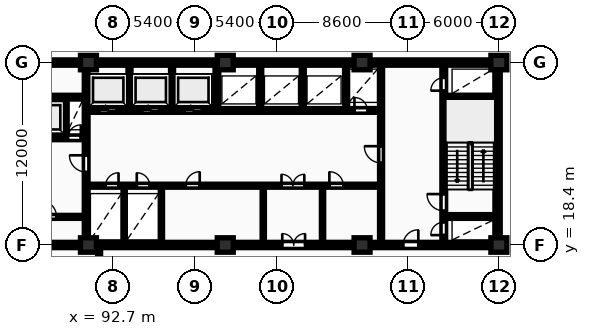
"""IFC4 building model, lengths in metres.
Left out: names, types, materials, properties, quantities, classifications, styles, units other than length and angle.
Written with IfcOpenShell. Run it as: python <this file> out.ifc"""

import sys

from ifc_helpers import new_model, si_unit, direction, frame, frame_2d, origin, origin_2d, place, context, subcontext, project, spatial, rectangle, extrude, element, fill, save


model = new_model("IFC4")
c1 = context("Model", 3, precision=1e-05, world=origin(), true_north=direction((0.0, 1.0)))
c2 = subcontext(c1, "Body", "Model", "MODEL_VIEW")
j1 = project(units=[si_unit("LENGTHUNIT", "METRE"), si_unit("PLANEANGLEUNIT", "RADIAN")], contexts=[c1])
p1 = place(None, origin())
s1 = spatial("IfcSite", under=j1, at=p1, CompositionType="ELEMENT")
p2 = place(p1, origin())
s2 = spatial("IfcBuilding", under=s1, at=p2, CompositionType="ELEMENT")
p3 = place(p2, frame((0.0, 0.0, 10.0)))
s3 = spatial("IfcBuildingStorey", under=s2, at=p3, CompositionType="ELEMENT", Elevation=10.0)
for number, where, z_axis, x_axis in (
    (1, (91.1, 18.4, 0.0), (0.0, 0.0, 1.0), (1.0, 0.0, 0.0)),
    (2, (91.1, 30.4, 0.0), (0.0, 0.0, 1.0), (1.0, 0.0, 0.0)),
    (3, (100.1, 18.4, 0.0), (0.0, 0.0, 1.0), (1.0, 0.0, 0.0)),
    (4, (100.1, 30.4, 0.0), (0.0, 0.0, 1.0), (1.0, 0.0, 0.0)),
    (5, (109.1, 18.4, 0.0), (0.0, 0.0, 1.0), (1.0, 0.0, 0.0)),
    (6, (109.1, 30.4, 0.0), (0.0, 0.0, 1.0), (1.0, 0.0, 0.0)),
    (7, (118.1, 18.4, 0.0), (0.0, 0.0, 1.0), (1.0, 0.0, 0.0)),
    (8, (118.1, 30.4, 0.0), (0.0, 0.0, 1.0), (1.0, 0.0, 0.0)),
):
    element("IfcColumn", number, at=place(p3, frame(where, z_axis=z_axis, x_axis=x_axis)), inside=s3, PredefinedType="COLUMN", context=c2, shape_type="SweptSolid", body=[
        extrude(rectangle(XDim=1.05, YDim=0.95, at=origin_2d()), origin(), (0.0, 0.0, 1.0), 4.5),
    ])
p4 = place(p3, frame((81.925, 30.4, 0.0), z_axis=(0.0, 0.0, 1.0), x_axis=(1.0, 0.0, 0.0)))
e9 = element("IfcWall", 9, at=p4, inside=s3, PredefinedType="SHEAR", context=c2, shape_type="SweptSolid", body=[
    extrude(rectangle(XDim=36.265, YDim=0.35, at=frame_2d((18.132, 0.0))), origin(), (0.0, 0.0, 1.0), 4.5),
])
p5 = place(p3, frame((118.015, 18.575, 0.0), z_axis=(0.0, 0.0, 1.0), x_axis=(0.0, 1.0, 0.0)))
e10 = element("IfcWall", 10, at=p5, inside=s3, PredefinedType="SHEAR", context=c2, shape_type="SweptSolid", body=[
    extrude(rectangle(XDim=11.65, YDim=0.35, at=frame_2d((5.825, 0.0))), origin(), (0.0, 0.0, 1.0), 4.5),
])
p6 = place(p3, frame((81.925, 18.4, 0.0), z_axis=(0.0, 0.0, 1.0), x_axis=(1.0, 0.0, 0.0)))
e11 = element("IfcWall", 11, at=p6, inside=s3, PredefinedType="SHEAR", context=c2, shape_type="SweptSolid", body=[
    extrude(rectangle(XDim=36.265, YDim=0.35, at=frame_2d((18.132, 0.0))), origin(), (0.0, 0.0, 1.0), 4.5),
])
p7 = place(p6, frame((5.675, 0.0, 0.0)))
e12 = element("IfcOpeningElement", 12, at=p7, cuts=e11, PredefinedType="OPENING", context=c2, shape_type="SweptSolid", body=[
    extrude(rectangle(XDim=1.0, YDim=2.15, at=frame_2d((0.5, 1.075))), frame((0.0, 0.185, 0.0), z_axis=(0.0, -1.0, 0.0), x_axis=(1.0, 0.0, 0.0)), (0.0, 0.0, 1.0), 0.37),
])
p8 = place(p6, frame((21.925, 0.0, 0.0)))
e13 = element("IfcOpeningElement", 13, at=p8, cuts=e11, PredefinedType="OPENING", context=c2, shape_type="SweptSolid", body=[
    extrude(rectangle(XDim=1.5, YDim=2.2, at=frame_2d((0.75, 1.1))), frame((0.0, 0.185, 0.0), z_axis=(0.0, -1.0, 0.0), x_axis=(1.0, 0.0, 0.0)), (0.0, 0.0, 1.0), 0.37),
])
p9 = place(p6, frame((29.875, 0.0, 0.0)))
e14 = element("IfcOpeningElement", 14, at=p9, cuts=e11, PredefinedType="OPENING", context=c2, shape_type="SweptSolid", body=[
    extrude(rectangle(XDim=1.0, YDim=2.15, at=frame_2d((0.5, 1.075))), frame((0.0, 0.185, 0.0), z_axis=(0.0, -1.0, 0.0), x_axis=(1.0, 0.0, 0.0)), (0.0, 0.0, 1.0), 0.37),
])
p10 = place(p3, frame((83.0, 28.125, 0.0), z_axis=(0.0, 0.0, 1.0), x_axis=(1.0, 0.0, 0.0)))
e15 = element("IfcWall", 15, at=p10, inside=s3, PredefinedType="SHEAR", context=c2, shape_type="SweptSolid", body=[
    extrude(rectangle(XDim=7.82, YDim=0.25, at=frame_2d((3.91, 0.0))), origin(), (0.0, 0.0, 1.0), 4.5),
])
p11 = place(p3, frame((86.5, 25.45, 0.0), z_axis=(0.0, 0.0, 1.0), x_axis=(1.0, 0.0, 0.0)))
e16 = element("IfcWall", 16, at=p11, inside=s3, PredefinedType="SHEAR", context=c2, shape_type="SweptSolid", body=[
    extrude(rectangle(XDim=4.32, YDim=0.25, at=frame_2d((2.16, 0.0))), origin(), (0.0, 0.0, 1.0), 4.5),
])
p12 = place(p11, frame((1.14, 0.0, 0.0)))
e17 = element("IfcOpeningElement", 17, at=p12, cuts=e16, PredefinedType="OPENING", context=c2, shape_type="SweptSolid", body=[
    extrude(rectangle(XDim=1.12, YDim=2.12, at=frame_2d((0.56, 1.06))), frame((0.0, 0.135, 0.0), z_axis=(0.0, -1.0, 0.0), x_axis=(1.0, 0.0, 0.0)), (0.0, 0.0, 1.0), 0.27),
])
p13 = place(p11, frame((3.25, 0.0, 0.0)))
e18 = element("IfcOpeningElement", 18, at=p13, cuts=e16, PredefinedType="OPENING", context=c2, shape_type="SweptSolid", body=[
    extrude(rectangle(XDim=0.85, YDim=2.05, at=frame_2d((0.425, 1.025))), frame((0.0, 0.135, 0.0), z_axis=(0.0, -1.0, 0.0), x_axis=(1.0, 0.0, 0.0)), (0.0, 0.0, 1.0), 0.27),
])
p14 = place(p3, frame((89.6, 25.58, 0.0), z_axis=(0.0, 0.0, 1.0), x_axis=(0.0, 1.0, 0.0)))
e19 = element("IfcWall", 19, at=p14, inside=s3, PredefinedType="PARTITIONING", context=c2, shape_type="SweptSolid", body=[
    extrude(rectangle(XDim=2.42, YDim=0.2, at=frame_2d((1.21, 0.0))), origin(), (0.0, 0.0, 1.0), 4.2),
])
p15 = place(p3, frame((86.5, 20.25, 0.0), z_axis=(0.0, 0.0, 1.0), x_axis=(1.0, 0.0, 0.0)))
e20 = element("IfcWall", 20, at=p15, inside=s3, PredefinedType="PARTITIONING", context=c2, shape_type="SweptSolid", body=[
    extrude(rectangle(XDim=4.32, YDim=0.2, at=frame_2d((2.16, 0.0))), origin(), (0.0, 0.0, 1.0), 4.2),
])
p16 = place(p15, frame((1.4, 0.0, 0.0)))
e21 = element("IfcOpeningElement", 21, at=p16, cuts=e20, PredefinedType="OPENING", context=c2, shape_type="SweptSolid", body=[
    extrude(rectangle(XDim=1.1, YDim=2.1, at=frame_2d((0.55, 1.05))), frame((0.0, 0.11, 0.0), z_axis=(0.0, -1.0, 0.0), x_axis=(1.0, 0.0, 0.0)), (0.0, 0.0, 1.0), 0.22),
])
p17 = place(p3, frame((90.95, 18.6, 0.0), z_axis=(0.0, 0.0, 1.0), x_axis=(0.0, 1.0, 0.0)))
e22 = element("IfcWall", 22, at=p17, inside=s3, PredefinedType="SHEAR", context=c2, shape_type="SweptSolid", body=[
    extrude(rectangle(XDim=11.6, YDim=0.25, at=frame_2d((5.8, 0.0))), origin(), (0.0, 0.0, 1.0), 4.5),
])
p18 = place(p17, frame((4.6, 0.0, 0.0)))
e23 = element("IfcOpeningElement", 23, at=p18, cuts=e22, PredefinedType="OPENING", context=c2, shape_type="SweptSolid", body=[
    extrude(rectangle(XDim=1.1, YDim=2.1, at=frame_2d((0.55, 1.05))), frame((0.0, 0.135, 0.0), z_axis=(0.0, -1.0, 0.0), x_axis=(1.0, 0.0, 0.0)), (0.0, 0.0, 1.0), 0.27),
])
for number, where, z_axis, x_axis in (
    (24, (93.8, 27.38, 0.0), (0.0, 0.0, 1.0), (0.0, 1.0, 0.0)),
    (25, (96.6, 27.38, 0.0), (0.0, 0.0, 1.0), (0.0, 1.0, 0.0)),
):
    element("IfcWall", number, at=place(p3, frame(where, z_axis=z_axis, x_axis=x_axis)), inside=s3, PredefinedType="PARTITIONING", context=c2, shape_type="SweptSolid", body=[
        extrude(rectangle(XDim=2.82, YDim=0.2, at=frame_2d((1.41, 0.0))), origin(), (0.0, 0.0, 1.0), 4.2),
    ])
p19 = place(p3, frame((91.08, 27.25, 0.0), z_axis=(0.0, 0.0, 1.0), x_axis=(1.0, 0.0, 0.0)))
e26 = element("IfcWall", 26, at=p19, inside=s3, PredefinedType="SHEAR", context=c2, shape_type="SweptSolid", body=[
    extrude(rectangle(XDim=8.34, YDim=0.25, at=frame_2d((4.17, 0.0))), origin(), (0.0, 0.0, 1.0), 4.5),
])
p20 = place(p19, frame((0.76, 0.0, 0.0)))
e27 = element("IfcOpeningElement", 27, at=p20, cuts=e26, PredefinedType="OPENING", context=c2, shape_type="SweptSolid", body=[
    extrude(rectangle(XDim=1.12, YDim=2.12, at=frame_2d((0.56, 1.06))), frame((0.0, 0.135, 0.0), z_axis=(0.0, -1.0, 0.0), x_axis=(1.0, 0.0, 0.0)), (0.0, 0.0, 1.0), 0.27),
])
p21 = place(p19, frame((3.56, 0.0, 0.0)))
e28 = element("IfcOpeningElement", 28, at=p21, cuts=e26, PredefinedType="OPENING", context=c2, shape_type="SweptSolid", body=[
    extrude(rectangle(XDim=1.12, YDim=2.12, at=frame_2d((0.56, 1.06))), frame((0.0, 0.135, 0.0), z_axis=(0.0, -1.0, 0.0), x_axis=(1.0, 0.0, 0.0)), (0.0, 0.0, 1.0), 0.27),
])
p22 = place(p19, frame((6.36, 0.0, 0.0)))
e29 = element("IfcOpeningElement", 29, at=p22, cuts=e26, PredefinedType="OPENING", context=c2, shape_type="SweptSolid", body=[
    extrude(rectangle(XDim=1.12, YDim=2.12, at=frame_2d((0.56, 1.06))), frame((0.0, 0.135, 0.0), z_axis=(0.0, -1.0, 0.0), x_axis=(1.0, 0.0, 0.0)), (0.0, 0.0, 1.0), 0.27),
])
p23 = place(p3, frame((99.55, 27.25, 0.0), z_axis=(0.0, 0.0, 1.0), x_axis=(0.0, 1.0, 0.0)))
e30 = element("IfcWall", 30, at=p23, inside=s3, PredefinedType="SHEAR", context=c2, shape_type="SweptSolid", body=[
    extrude(rectangle(XDim=2.95, YDim=0.25, at=frame_2d((1.475, 0.0))), origin(), (0.0, 0.0, 1.0), 4.5),
])
for number, where, z_axis, x_axis in (
    (31, (102.4, 27.38, 0.0), (0.0, 0.0, 1.0), (0.0, 1.0, 0.0)),
    (32, (105.2, 27.38, 0.0), (0.0, 0.0, 1.0), (0.0, 1.0, 0.0)),
    (33, (108.05, 27.38, 0.0), (0.0, 0.0, 1.0), (0.0, 1.0, 0.0)),
):
    element("IfcWall", number, at=place(p3, frame(where, z_axis=z_axis, x_axis=x_axis)), inside=s3, PredefinedType="PARTITIONING", context=c2, shape_type="SweptSolid", body=[
        extrude(rectangle(XDim=2.82, YDim=0.2, at=frame_2d((1.41, 0.0))), origin(), (0.0, 0.0, 1.0), 4.2),
    ])
p24 = place(p3, frame((99.68, 27.25, 0.0), z_axis=(0.0, 0.0, 1.0), x_axis=(1.0, 0.0, 0.0)))
e34 = element("IfcWall", 34, at=p24, inside=s3, PredefinedType="SHEAR", context=c2, shape_type="SweptSolid", body=[
    extrude(rectangle(XDim=10.54, YDim=0.25, at=frame_2d((5.27, 0.0))), origin(), (0.0, 0.0, 1.0), 4.5),
])
p25 = place(p24, frame((8.92, 0.0, 0.0)))
e35 = element("IfcOpeningElement", 35, at=p25, cuts=e34, PredefinedType="OPENING", context=c2, shape_type="SweptSolid", body=[
    extrude(rectangle(XDim=0.85, YDim=2.05, at=frame_2d((0.425, 1.025))), frame((0.0, 0.135, 0.0), z_axis=(0.0, -1.0, 0.0), x_axis=(1.0, 0.0, 0.0)), (0.0, 0.0, 1.0), 0.27),
])
for number, where, z_axis, x_axis in (
    (36, (93.45, 18.6, 0.0), (0.0, 0.0, 1.0), (0.0, 1.0, 0.0)),
    (37, (95.9, 18.6, 0.0), (0.0, 0.0, 1.0), (0.0, 1.0, 0.0)),
    (38, (102.6, 18.6, 0.0), (0.0, 0.0, 1.0), (0.0, 1.0, 0.0)),
    (39, (106.5, 18.6, 0.0), (0.0, 0.0, 1.0), (0.0, 1.0, 0.0)),
):
    element("IfcWall", number, at=place(p3, frame(where, z_axis=z_axis, x_axis=x_axis)), inside=s3, PredefinedType="PARTITIONING", context=c2, shape_type="SweptSolid", body=[
        extrude(rectangle(XDim=3.6, YDim=0.15, at=frame_2d((1.8, 0.0))), origin(), (0.0, 0.0, 1.0), 4.2),
    ])
p26 = place(p3, frame((91.08, 22.3, 0.0), z_axis=(0.0, 0.0, 1.0), x_axis=(1.0, 0.0, 0.0)))
e40 = element("IfcWall", 40, at=p26, inside=s3, PredefinedType="PARTITIONING", context=c2, shape_type="SweptSolid", body=[
    extrude(rectangle(XDim=19.14, YDim=0.2, at=frame_2d((9.57, 0.0))), origin(), (0.0, 0.0, 1.0), 4.2),
])
p27 = place(p26, frame((1.15, 0.0, 0.0)))
e41 = element("IfcOpeningElement", 41, at=p27, cuts=e40, PredefinedType="OPENING", context=c2, shape_type="SweptSolid", body=[
    extrude(rectangle(XDim=0.85, YDim=2.05, at=frame_2d((0.425, 1.025))), frame((0.0, 0.11, 0.0), z_axis=(0.0, -1.0, 0.0), x_axis=(1.0, 0.0, 0.0)), (0.0, 0.0, 1.0), 0.22),
])
p28 = place(p26, frame((3.2, 0.0, 0.0)))
e42 = element("IfcOpeningElement", 42, at=p28, cuts=e40, PredefinedType="OPENING", context=c2, shape_type="SweptSolid", body=[
    extrude(rectangle(XDim=0.85, YDim=2.05, at=frame_2d((0.425, 1.025))), frame((0.0, 0.11, 0.0), z_axis=(0.0, -1.0, 0.0), x_axis=(1.0, 0.0, 0.0)), (0.0, 0.0, 1.0), 0.22),
])
p29 = place(p26, frame((12.72, 0.0, 0.0)))
e43 = element("IfcOpeningElement", 43, at=p29, cuts=e40, PredefinedType="OPENING", context=c2, shape_type="SweptSolid", body=[
    extrude(rectangle(XDim=1.5, YDim=2.2, at=frame_2d((0.75, 1.1))), frame((0.0, 0.11, 0.0), z_axis=(0.0, -1.0, 0.0), x_axis=(1.0, 0.0, 0.0)), (0.0, 0.0, 1.0), 0.22),
])
p30 = place(p26, frame((6.42, 0.0, 0.0)))
e44 = element("IfcOpeningElement", 44, at=p30, cuts=e40, PredefinedType="OPENING", context=c2, shape_type="SweptSolid", body=[
    extrude(rectangle(XDim=0.92, YDim=2.08, at=frame_2d((0.46, 1.04))), frame((0.0, 0.11, 0.0), z_axis=(0.0, -1.0, 0.0), x_axis=(1.0, 0.0, 0.0)), (0.0, 0.0, 1.0), 0.22),
])
p31 = place(p26, frame((15.87, 0.0, 0.0)))
e45 = element("IfcOpeningElement", 45, at=p31, cuts=e40, PredefinedType="OPENING", context=c2, shape_type="SweptSolid", body=[
    extrude(rectangle(XDim=0.92, YDim=2.08, at=frame_2d((0.46, 1.04))), frame((0.0, 0.11, 0.0), z_axis=(0.0, -1.0, 0.0), x_axis=(1.0, 0.0, 0.0)), (0.0, 0.0, 1.0), 0.22),
])
p32 = place(p3, frame((110.35, 18.6, 0.0), z_axis=(0.0, 0.0, 1.0), x_axis=(0.0, 1.0, 0.0)))
e46 = element("IfcWall", 46, at=p32, inside=s3, PredefinedType="PARTITIONING", context=c2, shape_type="SweptSolid", body=[
    extrude(rectangle(XDim=11.6, YDim=0.2, at=frame_2d((5.8, 0.0))), origin(), (0.0, 0.0, 1.0), 4.2),
])
p33 = place(p32, frame((5.2, 0.0, 0.0)))
e47 = element("IfcOpeningElement", 47, at=p33, cuts=e46, PredefinedType="OPENING", context=c2, shape_type="SweptSolid", body=[
    extrude(rectangle(XDim=1.1, YDim=2.15, at=frame_2d((0.55, 1.075))), frame((0.0, 0.11, 0.0), z_axis=(0.0, -1.0, 0.0), x_axis=(1.0, 0.0, 0.0)), (0.0, 0.0, 1.0), 0.22),
])
p34 = place(p3, frame((114.475, 18.6, 0.0), z_axis=(0.0, 0.0, 1.0), x_axis=(0.0, 1.0, 0.0)))
e48 = element("IfcWall", 48, at=p34, inside=s3, PredefinedType="SHEAR", context=c2, shape_type="SweptSolid", body=[
    extrude(rectangle(XDim=11.6, YDim=0.25, at=frame_2d((5.8, 0.0))), origin(), (0.0, 0.0, 1.0), 4.5),
])
p35 = place(p34, frame((0.45, 0.0, 0.0)))
e49 = element("IfcOpeningElement", 49, at=p35, cuts=e48, PredefinedType="OPENING", context=c2, shape_type="SweptSolid", body=[
    extrude(rectangle(XDim=0.85, YDim=2.05, at=frame_2d((0.425, 1.025))), frame((0.0, 0.135, 0.0), z_axis=(0.0, -1.0, 0.0), x_axis=(1.0, 0.0, 0.0)), (0.0, 0.0, 1.0), 0.27),
])
p36 = place(p34, frame((2.05, 0.0, 0.0)))
e50 = element("IfcOpeningElement", 50, at=p36, cuts=e48, PredefinedType="OPENING", context=c2, shape_type="SweptSolid", body=[
    extrude(rectangle(XDim=1.1, YDim=2.1, at=frame_2d((0.55, 1.05))), frame((0.0, 0.135, 0.0), z_axis=(0.0, -1.0, 0.0), x_axis=(1.0, 0.0, 0.0)), (0.0, 0.0, 1.0), 0.27),
])
p37 = place(p34, frame((9.95, 0.0, 0.0)))
e51 = element("IfcOpeningElement", 51, at=p37, cuts=e48, PredefinedType="OPENING", context=c2, shape_type="SweptSolid", body=[
    extrude(rectangle(XDim=0.85, YDim=2.05, at=frame_2d((0.425, 1.025))), frame((0.0, 0.135, 0.0), z_axis=(0.0, -1.0, 0.0), x_axis=(1.0, 0.0, 0.0)), (0.0, 0.0, 1.0), 0.27),
])
for number, where, z_axis, x_axis in (
    (52, (114.6, 20.275, 0.0), (0.0, 0.0, 1.0), (1.0, 0.0, 0.0)),
    (53, (114.6, 28.125, 0.0), (0.0, 0.0, 1.0), (1.0, 0.0, 0.0)),
):
    element("IfcWall", number, at=place(p3, frame(where, z_axis=z_axis, x_axis=x_axis)), inside=s3, PredefinedType="SHEAR", context=c2, shape_type="SweptSolid", body=[
        extrude(rectangle(XDim=3.24, YDim=0.25, at=frame_2d((1.62, 0.0))), origin(), (0.0, 0.0, 1.0), 4.5),
    ])
p38 = place(p3, frame((91.8, -20.2, 0.0), z_axis=(0.0, 0.0, 1.0), x_axis=(0.0, 1.0, 0.0)))
e54 = element("IfcWall", 54, at=p38, inside=s3, PredefinedType="PARTITIONING", context=c2, shape_type="SweptSolid", body=[
    extrude(rectangle(XDim=38.45, YDim=0.2, at=frame_2d((19.225, 0.0))), origin(), (0.0, 0.0, 1.0), 4.2),
])
p39 = place(p38, frame((9.5, 0.0, 0.0)))
e55 = element("IfcOpeningElement", 55, at=p39, cuts=e54, PredefinedType="OPENING", context=c2, shape_type="SweptSolid", body=[
    extrude(rectangle(XDim=1.22, YDim=2.18, at=frame_2d((0.61, 1.09))), frame((0.0, 0.11, 0.0), z_axis=(0.0, -1.0, 0.0), x_axis=(1.0, 0.0, 0.0)), (0.0, 0.0, 1.0), 0.22),
])
p40 = place(p8, origin())
e56 = element("IfcDoor", 56, at=p40, inside=s3, OperationType="DOUBLE_DOOR_SINGLE_SWING", PredefinedType="DOOR", context=c2, shape_type="SweptSolid", body=[
    extrude(rectangle(XDim=1.5, YDim=2.2, at=frame_2d((0.75, 1.1))), frame((0.0, 0.025, 0.0), z_axis=(0.0, -1.0, 0.0), x_axis=(1.0, 0.0, 0.0)), (0.0, 0.0, 1.0), 0.05),
])
fill(e13, e56)
p41 = place(p9, origin())
e57 = element("IfcDoor", 57, at=p41, inside=s3, OperationType="SINGLE_SWING_RIGHT", PredefinedType="DOOR", context=c2, shape_type="SweptSolid", body=[
    extrude(rectangle(XDim=1.0, YDim=2.15, at=frame_2d((0.5, 1.075))), frame((0.0, 0.025, 0.0), z_axis=(0.0, -1.0, 0.0), x_axis=(1.0, 0.0, 0.0)), (0.0, 0.0, 1.0), 0.05),
])
fill(e14, e57)
p42 = place(p12, origin())
e58 = element("IfcDoor", 58, at=p42, inside=s3, OperationType="SLIDING_TO_RIGHT", PredefinedType="DOOR", context=c2, shape_type="SweptSolid", body=[
    extrude(rectangle(XDim=1.12, YDim=2.12, at=frame_2d((0.56, 1.06))), frame((0.0, 0.025, 0.0), z_axis=(0.0, -1.0, 0.0), x_axis=(1.0, 0.0, 0.0)), (0.0, 0.0, 1.0), 0.05),
])
fill(e17, e58)
p43 = place(p13, origin())
e59 = element("IfcDoor", 59, at=p43, inside=s3, OperationType="SINGLE_SWING_RIGHT", PredefinedType="DOOR", context=c2, shape_type="SweptSolid", body=[
    extrude(rectangle(XDim=0.85, YDim=2.05, at=frame_2d((0.425, 1.025))), frame((0.0, 0.025, 0.0), z_axis=(0.0, -1.0, 0.0), x_axis=(1.0, 0.0, 0.0)), (0.0, 0.0, 1.0), 0.05),
])
fill(e18, e59)
p44 = place(p16, origin())
e60 = element("IfcDoor", 60, at=p44, inside=s3, OperationType="SINGLE_SWING_LEFT", PredefinedType="DOOR", context=c2, shape_type="SweptSolid", body=[
    extrude(rectangle(XDim=1.1, YDim=2.1, at=frame_2d((0.55, 1.05))), frame((0.0, 0.025, 0.0), z_axis=(0.0, -1.0, 0.0), x_axis=(1.0, 0.0, 0.0)), (0.0, 0.0, 1.0), 0.05),
])
fill(e21, e60)
p45 = place(p18, origin())
e61 = element("IfcDoor", 61, at=p45, inside=s3, OperationType="SINGLE_SWING_RIGHT", PredefinedType="DOOR", context=c2, shape_type="SweptSolid", body=[
    extrude(rectangle(XDim=1.1, YDim=2.1, at=frame_2d((0.55, 1.05))), frame((0.0, 0.025, 0.0), z_axis=(0.0, -1.0, 0.0), x_axis=(1.0, 0.0, 0.0)), (0.0, 0.0, 1.0), 0.05),
])
fill(e23, e61)
p46 = place(p20, origin())
e62 = element("IfcDoor", 62, at=p46, inside=s3, OperationType="SLIDING_TO_LEFT", PredefinedType="DOOR", context=c2, shape_type="SweptSolid", body=[
    extrude(rectangle(XDim=1.12, YDim=2.12, at=frame_2d((0.56, 1.06))), frame((0.0, 0.025, 0.0), z_axis=(0.0, -1.0, 0.0), x_axis=(1.0, 0.0, 0.0)), (0.0, 0.0, 1.0), 0.05),
])
fill(e27, e62)
p47 = place(p21, origin())
e63 = element("IfcDoor", 63, at=p47, inside=s3, OperationType="SLIDING_TO_LEFT", PredefinedType="DOOR", context=c2, shape_type="SweptSolid", body=[
    extrude(rectangle(XDim=1.12, YDim=2.12, at=frame_2d((0.56, 1.06))), frame((0.0, 0.025, 0.0), z_axis=(0.0, -1.0, 0.0), x_axis=(1.0, 0.0, 0.0)), (0.0, 0.0, 1.0), 0.05),
])
fill(e28, e63)
p48 = place(p22, origin())
e64 = element("IfcDoor", 64, at=p48, inside=s3, OperationType="SLIDING_TO_LEFT", PredefinedType="DOOR", context=c2, shape_type="SweptSolid", body=[
    extrude(rectangle(XDim=1.12, YDim=2.12, at=frame_2d((0.56, 1.06))), frame((0.0, 0.025, 0.0), z_axis=(0.0, -1.0, 0.0), x_axis=(1.0, 0.0, 0.0)), (0.0, 0.0, 1.0), 0.05),
])
fill(e29, e64)
p49 = place(p25, origin())
e65 = element("IfcDoor", 65, at=p49, inside=s3, OperationType="SINGLE_SWING_LEFT", PredefinedType="DOOR", context=c2, shape_type="SweptSolid", body=[
    extrude(rectangle(XDim=0.85, YDim=2.05, at=frame_2d((0.425, 1.025))), frame((0.0, 0.025, 0.0), z_axis=(0.0, -1.0, 0.0), x_axis=(1.0, 0.0, 0.0)), (0.0, 0.0, 1.0), 0.05),
])
fill(e35, e65)
p50 = place(p27, origin())
e66 = element("IfcDoor", 66, at=p50, inside=s3, OperationType="SINGLE_SWING_RIGHT", PredefinedType="DOOR", context=c2, shape_type="SweptSolid", body=[
    extrude(rectangle(XDim=0.85, YDim=2.05, at=frame_2d((0.425, 1.025))), frame((0.0, 0.025, 0.0), z_axis=(0.0, -1.0, 0.0), x_axis=(1.0, 0.0, 0.0)), (0.0, 0.0, 1.0), 0.05),
])
fill(e41, e66)
p51 = place(p28, origin())
e67 = element("IfcDoor", 67, at=p51, inside=s3, OperationType="SINGLE_SWING_LEFT", PredefinedType="DOOR", context=c2, shape_type="SweptSolid", body=[
    extrude(rectangle(XDim=0.85, YDim=2.05, at=frame_2d((0.425, 1.025))), frame((0.0, 0.025, 0.0), z_axis=(0.0, -1.0, 0.0), x_axis=(1.0, 0.0, 0.0)), (0.0, 0.0, 1.0), 0.05),
])
fill(e42, e67)
p52 = place(p29, origin())
e68 = element("IfcDoor", 68, at=p52, inside=s3, OperationType="DOUBLE_DOOR_SINGLE_SWING", PredefinedType="DOOR", context=c2, shape_type="SweptSolid", body=[
    extrude(rectangle(XDim=1.5, YDim=2.2, at=frame_2d((0.75, 1.1))), frame((0.0, 0.025, 0.0), z_axis=(0.0, -1.0, 0.0), x_axis=(1.0, 0.0, 0.0)), (0.0, 0.0, 1.0), 0.05),
])
fill(e43, e68)
p53 = place(p30, origin())
e69 = element("IfcDoor", 69, at=p53, inside=s3, OperationType="SINGLE_SWING_RIGHT", PredefinedType="DOOR", context=c2, shape_type="SweptSolid", body=[
    extrude(rectangle(XDim=0.92, YDim=2.08, at=frame_2d((0.46, 1.04))), frame((0.0, 0.025, 0.0), z_axis=(0.0, -1.0, 0.0), x_axis=(1.0, 0.0, 0.0)), (0.0, 0.0, 1.0), 0.05),
])
fill(e44, e69)
p54 = place(p31, origin())
e70 = element("IfcDoor", 70, at=p54, inside=s3, OperationType="SINGLE_SWING_LEFT", PredefinedType="DOOR", context=c2, shape_type="SweptSolid", body=[
    extrude(rectangle(XDim=0.92, YDim=2.08, at=frame_2d((0.46, 1.04))), frame((0.0, 0.025, 0.0), z_axis=(0.0, -1.0, 0.0), x_axis=(1.0, 0.0, 0.0)), (0.0, 0.0, 1.0), 0.05),
])
fill(e45, e70)
p55 = place(p33, origin())
e71 = element("IfcDoor", 71, at=p55, inside=s3, OperationType="SINGLE_SWING_RIGHT", PredefinedType="DOOR", context=c2, shape_type="SweptSolid", body=[
    extrude(rectangle(XDim=1.1, YDim=2.15, at=frame_2d((0.55, 1.075))), frame((0.0, 0.025, 0.0), z_axis=(0.0, -1.0, 0.0), x_axis=(1.0, 0.0, 0.0)), (0.0, 0.0, 1.0), 0.05),
])
fill(e47, e71)
p56 = place(p35, origin())
e72 = element("IfcDoor", 72, at=p56, inside=s3, OperationType="SINGLE_SWING_LEFT", PredefinedType="DOOR", context=c2, shape_type="SweptSolid", body=[
    extrude(rectangle(XDim=0.85, YDim=2.05, at=frame_2d((0.425, 1.025))), frame((0.0, 0.025, 0.0), z_axis=(0.0, -1.0, 0.0), x_axis=(1.0, 0.0, 0.0)), (0.0, 0.0, 1.0), 0.05),
])
fill(e49, e72)
p57 = place(p36, origin())
e73 = element("IfcDoor", 73, at=p57, inside=s3, OperationType="SINGLE_SWING_RIGHT", PredefinedType="DOOR", context=c2, shape_type="SweptSolid", body=[
    extrude(rectangle(XDim=1.1, YDim=2.1, at=frame_2d((0.55, 1.05))), frame((0.0, 0.025, 0.0), z_axis=(0.0, -1.0, 0.0), x_axis=(1.0, 0.0, 0.0)), (0.0, 0.0, 1.0), 0.05),
])
fill(e50, e73)
p58 = place(p37, origin())
e74 = element("IfcDoor", 74, at=p58, inside=s3, OperationType="SINGLE_SWING_LEFT", PredefinedType="DOOR", context=c2, shape_type="SweptSolid", body=[
    extrude(rectangle(XDim=0.85, YDim=2.05, at=frame_2d((0.425, 1.025))), frame((0.0, 0.025, 0.0), z_axis=(0.0, -1.0, 0.0), x_axis=(1.0, 0.0, 0.0)), (0.0, 0.0, 1.0), 0.05),
])
fill(e51, e74)
save(model, sys.argv[1])
